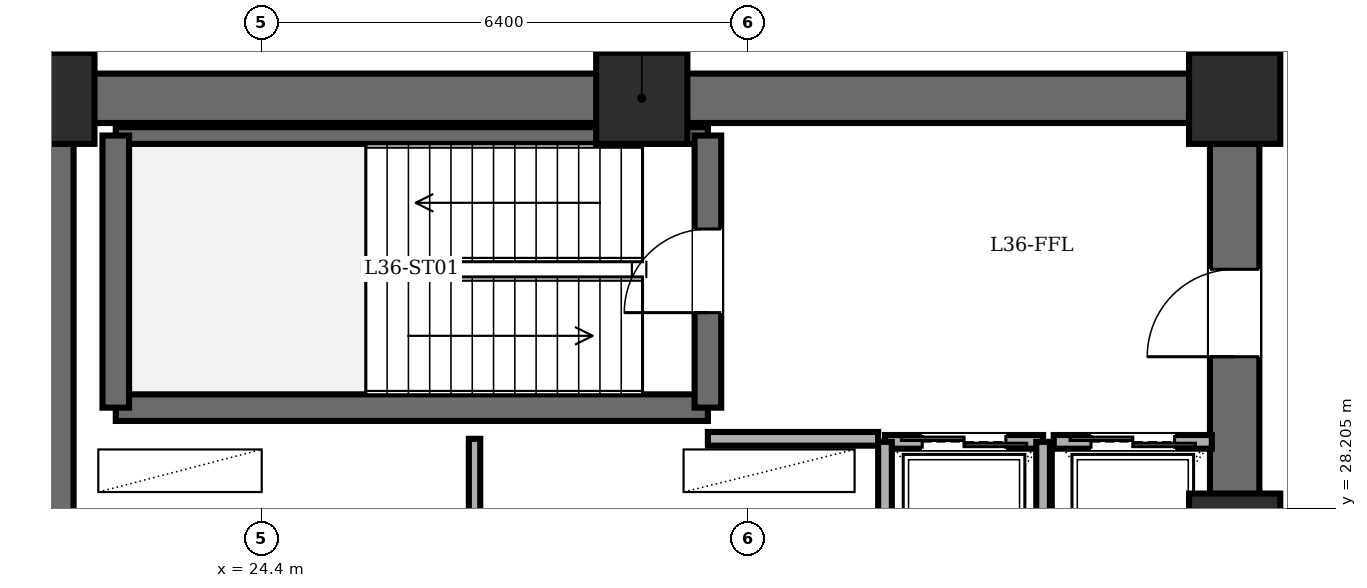
"""IFC4 building model, lengths in metres.
Left out: names, types, materials, properties, quantities, classifications, styles, units other than length and angle.
Written with IfcOpenShell. Run it as: python <this file> out.ifc"""

import sys

from ifc_helpers import new_model, si_unit, direction, frame, frame_2d, origin, origin_2d, place, context, subcontext, project, spatial, rectangle, extrude, element, fill, save


model = new_model("IFC4")
c1 = context("Model", 3, precision=1e-05, world=origin(), true_north=direction((0.0, 1.0)))
c2 = subcontext(c1, "Body", "Model", "MODEL_VIEW")
j1 = project(units=[si_unit("LENGTHUNIT", "METRE"), si_unit("PLANEANGLEUNIT", "RADIAN")], contexts=[c1])
p1 = place(None, origin())
s1 = spatial("IfcSite", under=j1, at=p1, CompositionType="ELEMENT")
p2 = place(p1, origin())
s2 = spatial("IfcBuilding", under=s1, at=p2, CompositionType="ELEMENT")
p3 = place(p2, frame((0.0, 0.0, 138.7)))
s3 = spatial("IfcBuildingStorey", under=s2, at=p3, CompositionType="ELEMENT", Elevation=138.7)
for number, where, z_axis, x_axis in (
    (1, (37.2, 27.8, 0.0), (0.0, 0.0, 1.0), (1.0, 0.0, 0.0)),
    (2, (37.2, 33.6, 0.0), (0.0, 0.0, 1.0), (1.0, 0.0, 0.0)),
    (3, (29.4, 33.6, 0.0), (0.0, 0.0, 1.0), (1.0, 0.0, 0.0)),
    (4, (21.6, 33.6, 0.0), (0.0, 0.0, 1.0), (1.0, 0.0, 0.0)),
):
    element("IfcColumn", number, at=place(p3, frame(where, z_axis=z_axis, x_axis=x_axis)), inside=s3, PredefinedType="COLUMN", context=c2, shape_type="SweptSolid", body=[
        extrude(rectangle(XDim=1.2, YDim=1.2, at=origin_2d()), origin(), (0.0, 0.0, 1.0), 5.1),
    ])
p4 = place(p3, frame((21.6, 14.4, 0.0), z_axis=(0.0, 0.0, 1.0), x_axis=(0.0, 1.0, 0.0)))
e5 = element("IfcWall", 5, at=p4, inside=s3, PredefinedType="SHEAR", context=c2, shape_type="SweptSolid", body=[
    extrude(rectangle(XDim=19.2, YDim=0.65, at=frame_2d((9.6, 0.0))), origin(), (0.0, 0.0, 1.0), 4.9),
])
p5 = place(p3, frame((21.6, 33.6, 0.0), z_axis=(0.0, 0.0, 1.0), x_axis=(1.0, 0.0, 0.0)))
e6 = element("IfcWall", 6, at=p5, inside=s3, PredefinedType="SHEAR", context=c2, shape_type="SweptSolid", body=[
    extrude(rectangle(XDim=15.6, YDim=0.65, at=frame_2d((7.8, 0.0))), origin(), (0.0, 0.0, 1.0), 4.9),
])
p6 = place(p3, frame((37.2, 14.4, 0.0), z_axis=(0.0, 0.0, 1.0), x_axis=(0.0, 1.0, 0.0)))
e7 = element("IfcWall", 7, at=p6, inside=s3, PredefinedType="SHEAR", context=c2, shape_type="SweptSolid", body=[
    extrude(rectangle(XDim=19.2, YDim=0.65, at=frame_2d((9.6, 0.0))), origin(), (0.0, 0.0, 1.0), 4.9),
])
p7 = place(p6, frame((15.8, 0.0, 0.0)))
e8 = element("IfcOpeningElement", 8, at=p7, cuts=e7, PredefinedType="OPENING", context=c2, shape_type="SweptSolid", body=[
    extrude(rectangle(XDim=1.15, YDim=2.15, at=frame_2d((0.575, 1.075))), frame((0.0, 0.335, 0.0), z_axis=(0.0, -1.0, 0.0), x_axis=(1.0, 0.0, 0.0)), (0.0, 0.0, 1.0), 0.67),
])
p8 = place(p6, frame((3.6, 0.0, 0.0)))
e9 = element("IfcOpeningElement", 9, at=p8, cuts=e7, PredefinedType="OPENING", context=c2, shape_type="SweptSolid", body=[
    extrude(rectangle(XDim=1.1, YDim=2.15, at=frame_2d((0.55, 1.075))), frame((0.0, 0.335, 0.0), z_axis=(0.0, -1.0, 0.0), x_axis=(1.0, 0.0, 0.0)), (0.0, 0.0, 1.0), 0.67),
])
p9 = place(p6, frame((8.6, 0.0, 0.0)))
e10 = element("IfcOpeningElement", 10, at=p9, cuts=e7, PredefinedType="OPENING", context=c2, shape_type="SweptSolid", body=[
    extrude(rectangle(XDim=1.3, YDim=2.2, at=frame_2d((0.65, 1.1))), frame((0.0, 0.335, 0.0), z_axis=(0.0, -1.0, 0.0), x_axis=(1.0, 0.0, 0.0)), (0.0, 0.0, 1.0), 0.67),
])
p10 = place(p3, frame((22.48, 29.53, 0.0), z_axis=(0.0, 0.0, 1.0), x_axis=(1.0, 0.0, 0.0)))
e11 = element("IfcWall", 11, at=p10, inside=s3, PredefinedType="SOLIDWALL", context=c2, shape_type="SweptSolid", body=[
    extrude(rectangle(XDim=7.79, YDim=0.35, at=frame_2d((3.895, 0.0))), origin(), (0.0, 0.0, 1.0), 4.9),
])
p11 = place(p3, frame((22.48, 33.11, 0.0), z_axis=(0.0, 0.0, 1.0), x_axis=(1.0, 0.0, 0.0)))
e12 = element("IfcWall", 12, at=p11, inside=s3, PredefinedType="PARTITIONING", context=c2, shape_type="SweptSolid", body=[
    extrude(rectangle(XDim=7.79, YDim=0.22, at=frame_2d((3.895, 0.0))), origin(), (0.0, 0.0, 1.0), 4.9),
])
p12 = place(p3, frame((22.48, 29.53, 0.0), z_axis=(0.0, 0.0, 1.0), x_axis=(0.0, 1.0, 0.0)))
e13 = element("IfcWall", 13, at=p12, inside=s3, PredefinedType="SOLIDWALL", context=c2, shape_type="SweptSolid", body=[
    extrude(rectangle(XDim=3.58, YDim=0.35, at=frame_2d((1.79, 0.0))), origin(), (0.0, 0.0, 1.0), 4.9),
])
p13 = place(p3, frame((30.27, 29.53, 0.0), z_axis=(0.0, 0.0, 1.0), x_axis=(0.0, 1.0, 0.0)))
e14 = element("IfcWall", 14, at=p13, inside=s3, PredefinedType="SOLIDWALL", context=c2, shape_type="SweptSolid", body=[
    extrude(rectangle(XDim=3.58, YDim=0.35, at=frame_2d((1.79, 0.0))), origin(), (0.0, 0.0, 1.0), 4.9),
])
p14 = place(p13, frame((1.25, 0.0, 0.0)))
e15 = element("IfcOpeningElement", 15, at=p14, cuts=e14, PredefinedType="OPENING", context=c2, shape_type="SweptSolid", body=[
    extrude(rectangle(XDim=1.1, YDim=2.15, at=frame_2d((0.55, 1.075))), frame((0.0, 0.185, 0.0), z_axis=(0.0, -1.0, 0.0), x_axis=(1.0, 0.0, 0.0)), (0.0, 0.0, 1.0), 0.37),
])
p15 = place(p3, frame((30.27, 29.12, 0.0), z_axis=(0.0, 0.0, 1.0), x_axis=(1.0, 0.0, 0.0)))
e16 = element("IfcWall", 16, at=p15, inside=s3, PredefinedType="PARTITIONING", context=c2, shape_type="SweptSolid", body=[
    extrude(rectangle(XDim=2.24, YDim=0.18, at=frame_2d((1.12, 0.0))), origin(), (0.0, 0.0, 1.0), 4.9),
])
p16 = place(p3, frame((27.2, 27.6, 0.0), z_axis=(0.0, 0.0, 1.0), x_axis=(0.0, 1.0, 0.0)))
e17 = element("IfcWall", 17, at=p16, inside=s3, PredefinedType="PARTITIONING", context=c2, shape_type="SweptSolid", body=[
    extrude(rectangle(XDim=1.52, YDim=0.15, at=frame_2d((0.76, 0.0))), origin(), (0.0, 0.0, 1.0), 4.9),
])
p17 = place(p3, frame((32.6, 29.08, 0.0), z_axis=(0.0, 0.0, 1.0), x_axis=(1.0, 0.0, 0.0)))
e18 = element("IfcWall", 18, at=p17, inside=s3, PredefinedType="PARTITIONING", context=c2, shape_type="SweptSolid", body=[
    extrude(rectangle(XDim=2.08, YDim=0.18, at=frame_2d((1.04, 0.0))), origin(), (0.0, 0.0, 1.0), 4.9),
])
p18 = place(p17, frame((0.49, 0.0, 0.0)))
e19 = element("IfcOpeningElement", 19, at=p18, cuts=e18, PredefinedType="OPENING", context=c2, shape_type="SweptSolid", body=[
    extrude(rectangle(XDim=1.1, YDim=2.2, at=frame_2d((0.55, 1.1))), frame((0.0, 0.1, 0.0), z_axis=(0.0, -1.0, 0.0), x_axis=(1.0, 0.0, 0.0)), (0.0, 0.0, 1.0), 0.2),
])
for number, where, z_axis, x_axis in (
    (20, (34.68, 26.35, 0.0), (0.0, 0.0, 1.0), (0.0, 1.0, 0.0)),
    (21, (32.6, 29.08, 0.0), (0.0, 0.0, 1.0), (0.0, -1.0, 0.0)),
):
    element("IfcWall", number, at=place(p3, frame(where, z_axis=z_axis, x_axis=x_axis)), inside=s3, PredefinedType="PARTITIONING", context=c2, shape_type="SweptSolid", body=[
        extrude(rectangle(XDim=2.73, YDim=0.18, at=frame_2d((1.365, 0.0))), origin(), (0.0, 0.0, 1.0), 4.9),
    ])
p19 = place(p3, frame((34.82, 29.08, 0.0), z_axis=(0.0, 0.0, 1.0), x_axis=(1.0, 0.0, 0.0)))
e22 = element("IfcWall", 22, at=p19, inside=s3, PredefinedType="PARTITIONING", context=c2, shape_type="SweptSolid", body=[
    extrude(rectangle(XDim=2.08, YDim=0.18, at=frame_2d((1.04, 0.0))), origin(), (0.0, 0.0, 1.0), 4.9),
])
p20 = place(p19, frame((0.49, 0.0, 0.0)))
e23 = element("IfcOpeningElement", 23, at=p20, cuts=e22, PredefinedType="OPENING", context=c2, shape_type="SweptSolid", body=[
    extrude(rectangle(XDim=1.1, YDim=2.2, at=frame_2d((0.55, 1.1))), frame((0.0, 0.1, 0.0), z_axis=(0.0, -1.0, 0.0), x_axis=(1.0, 0.0, 0.0)), (0.0, 0.0, 1.0), 0.2),
])
p21 = place(p14, origin())
e24 = element("IfcDoor", 24, at=p21, inside=s3, OperationType="SINGLE_SWING_LEFT", PredefinedType="DOOR", context=c2, shape_type="SweptSolid", body=[
    extrude(rectangle(XDim=1.1, YDim=2.15, at=frame_2d((0.55, 1.075))), frame((0.0, 0.025, 0.0), z_axis=(0.0, -1.0, 0.0), x_axis=(1.0, 0.0, 0.0)), (0.0, 0.0, 1.0), 0.05),
])
fill(e15, e24)
p22 = place(p7, origin())
e25 = element("IfcDoor", 25, at=p22, inside=s3, OperationType="SINGLE_SWING_LEFT", PredefinedType="DOOR", context=c2, shape_type="SweptSolid", body=[
    extrude(rectangle(XDim=1.15, YDim=2.15, at=frame_2d((0.575, 1.075))), frame((0.0, 0.025, 0.0), z_axis=(0.0, -1.0, 0.0), x_axis=(1.0, 0.0, 0.0)), (0.0, 0.0, 1.0), 0.05),
])
fill(e8, e25)
p23 = place(p18, origin())
e26 = element("IfcDoor", 26, at=p23, inside=s3, OperationType="DOUBLE_DOOR_SLIDING", PredefinedType="DOOR", context=c2, shape_type="SweptSolid", body=[
    extrude(rectangle(XDim=1.1, YDim=2.2, at=frame_2d((0.55, 1.1))), frame((0.0, 0.025, 0.0), z_axis=(0.0, -1.0, 0.0), x_axis=(1.0, 0.0, 0.0)), (0.0, 0.0, 1.0), 0.05),
])
fill(e19, e26)
p24 = place(p20, origin())
e27 = element("IfcDoor", 27, at=p24, inside=s3, OperationType="DOUBLE_DOOR_SLIDING", PredefinedType="DOOR", context=c2, shape_type="SweptSolid", body=[
    extrude(rectangle(XDim=1.1, YDim=2.2, at=frame_2d((0.55, 1.1))), frame((0.0, 0.025, 0.0), z_axis=(0.0, -1.0, 0.0), x_axis=(1.0, 0.0, 0.0)), (0.0, 0.0, 1.0), 0.05),
])
fill(e23, e27)
save(model, sys.argv[1])
